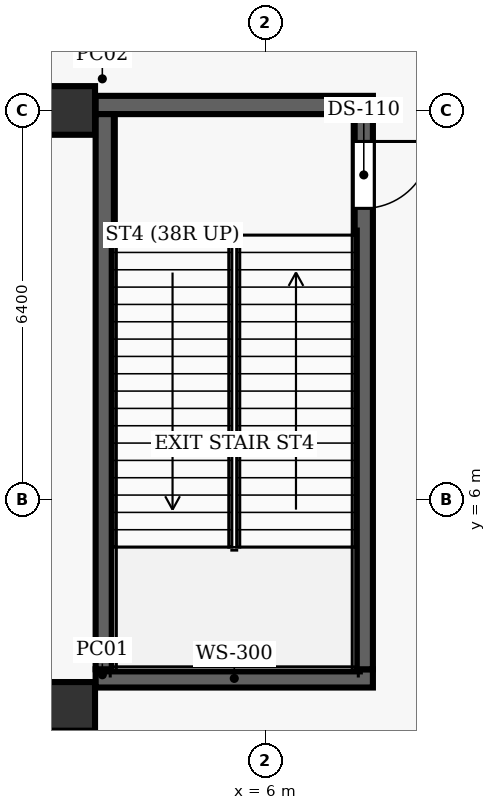
"""IFC4 building model, lengths in metres.
Left out: names, types, materials, properties, quantities, classifications, styles, units other than length and angle.
Written with IfcOpenShell. Run it as: python <this file> out.ifc"""

import sys

from ifc_helpers import new_model, si_unit, direction, frame, frame_2d, origin, origin_2d, place, context, subcontext, project, spatial, rectangle, extrude, element, fill, save


model = new_model("IFC4")
c1 = context("Model", 3, precision=1e-05, world=origin(), true_north=direction((0.0, 1.0)))
c2 = subcontext(c1, "Body", "Model", "MODEL_VIEW")
j1 = project(units=[si_unit("LENGTHUNIT", "METRE"), si_unit("PLANEANGLEUNIT", "RADIAN")], contexts=[c1])
p1 = place(None, origin())
s1 = spatial("IfcSite", under=j1, at=p1, CompositionType="ELEMENT")
p2 = place(p1, origin())
s2 = spatial("IfcBuilding", under=s1, at=p2, CompositionType="ELEMENT")
p3 = place(p2, frame((0.0, 0.0, 12.0)))
s3 = spatial("IfcBuildingStorey", under=s2, at=p3, CompositionType="ELEMENT", Elevation=12.0)
for number, where, z_axis, x_axis in (
    (1, (2.8, 2.6, 0.0), (0.0, 0.0, 1.0), (1.0, 0.0, 0.0)),
    (2, (2.8, 12.4, 0.0), (0.0, 0.0, 1.0), (1.0, 0.0, 0.0)),
):
    element("IfcColumn", number, at=place(p3, frame(where, z_axis=z_axis, x_axis=x_axis)), inside=s3, PredefinedType="COLUMN", context=c2, shape_type="SweptSolid", body=[
        extrude(rectangle(XDim=0.8, YDim=0.8, at=origin_2d()), origin(), (0.0, 0.0, 1.0), 6.6),
    ])
for number, where, z_axis, x_axis in (
    (3, (3.21, 3.06, 0.0), (0.0, 0.0, 1.0), (1.0, 0.0, 0.0)),
    (4, (3.21, 12.49, 0.0), (0.0, 0.0, 1.0), (1.0, 0.0, 0.0)),
):
    element("IfcWall", number, at=place(p3, frame(where, z_axis=z_axis, x_axis=x_axis)), inside=s3, PredefinedType="SHEAR", context=c2, shape_type="SweptSolid", body=[
        extrude(rectangle(XDim=4.56, YDim=0.3, at=frame_2d((2.28, 0.0))), origin(), (0.0, 0.0, 1.0), 6.6),
    ])
p4 = place(p3, frame((3.36, 3.21, 0.0), z_axis=(0.0, 0.0, 1.0), x_axis=(0.0, 1.0, 0.0)))
e5 = element("IfcWall", 5, at=p4, inside=s3, PredefinedType="SHEAR", context=c2, shape_type="SweptSolid", body=[
    extrude(rectangle(XDim=9.13, YDim=0.3, at=frame_2d((4.565, 0.0))), origin(), (0.0, 0.0, 1.0), 6.6),
])
p5 = place(p3, frame((7.62, 12.34, 0.0), z_axis=(0.0, 0.0, 1.0), x_axis=(0.0, -1.0, 0.0)))
e6 = element("IfcWall", 6, at=p5, inside=s3, PredefinedType="SHEAR", context=c2, shape_type="SweptSolid", body=[
    extrude(rectangle(XDim=9.13, YDim=0.3, at=frame_2d((4.565, 0.0))), origin(), (0.0, 0.0, 1.0), 6.6),
])
p6 = place(p5, frame((0.45, 0.0, 0.0)))
e7 = element("IfcOpeningElement", 7, at=p6, cuts=e6, PredefinedType="OPENING", context=c2, shape_type="SweptSolid", body=[
    extrude(rectangle(XDim=1.1, YDim=2.15, at=frame_2d((0.55, 1.075))), frame((0.0, 0.16, 0.0), z_axis=(0.0, -1.0, 0.0), x_axis=(1.0, 0.0, 0.0)), (0.0, 0.0, 1.0), 0.32),
])
p7 = place(p6, origin())
e8 = element("IfcDoor", 8, at=p7, inside=s3, OperationType="SINGLE_SWING_LEFT", PredefinedType="DOOR", context=c2, shape_type="SweptSolid", body=[
    extrude(rectangle(XDim=1.1, YDim=2.15, at=frame_2d((0.55, 1.075))), frame((0.0, 0.025, 0.0), z_axis=(0.0, -1.0, 0.0), x_axis=(1.0, 0.0, 0.0)), (0.0, 0.0, 1.0), 0.05),
])
fill(e7, e8)
save(model, sys.argv[1])
